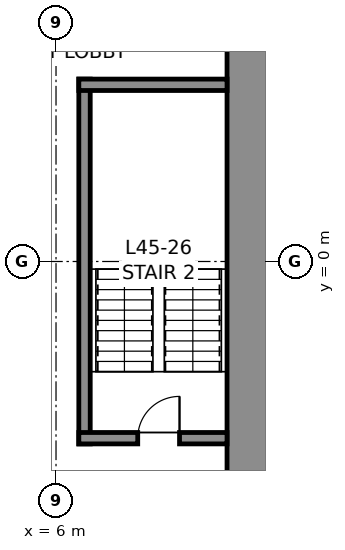
"""IFC4 building model, lengths in metres.
Left out: names, types, materials, properties, quantities, classifications, styles, units other than length and angle.
Written with IfcOpenShell. Run it as: python <this file> out.ifc"""

import sys

from ifc_helpers import new_model, si_unit, direction, frame, frame_2d, origin, place, context, subcontext, project, spatial, rectangle, extrude, element, fill, save


model = new_model("IFC4")
c1 = context("Model", 3, precision=1e-05, world=origin(), true_north=direction((0.0, 1.0)))
c2 = subcontext(c1, "Body", "Model", "MODEL_VIEW")
j1 = project(units=[si_unit("LENGTHUNIT", "METRE"), si_unit("PLANEANGLEUNIT", "RADIAN")], contexts=[c1])
p1 = place(None, origin())
s1 = spatial("IfcSite", under=j1, at=p1, CompositionType="ELEMENT")
p2 = place(p1, origin())
s2 = spatial("IfcBuilding", under=s1, at=p2, CompositionType="ELEMENT")
p3 = place(p2, frame((0.0, 0.0, 209.8)))
s3 = spatial("IfcBuildingStorey", under=s2, at=p3, CompositionType="ELEMENT", Elevation=209.8)
p4 = place(p3, frame((11.25, 10.5, 0.0), z_axis=(0.0, 0.0, 1.0), x_axis=(0.0, -1.0, 0.0)))
e1 = element("IfcWall", 1, at=p4, inside=s3, PredefinedType="SHEAR", context=c2, shape_type="SweptSolid", body=[
    extrude(rectangle(XDim=21.0, YDim=1.5, at=frame_2d((10.5, 0.0))), origin(), (0.0, 0.0, 1.0), 4.0),
])
p5 = place(p4, frame((3.7, 0.0, 0.0)))
e2 = element("IfcOpeningElement", 2, at=p5, cuts=e1, PredefinedType="OPENING", context=c2, shape_type="SweptSolid", body=[
    extrude(rectangle(XDim=1.2, YDim=2.3, at=frame_2d((0.6, 1.15))), frame((0.0, 0.76, 0.0), z_axis=(0.0, -1.0, 0.0), x_axis=(1.0, 0.0, 0.0)), (0.0, 0.0, 1.0), 1.52),
])
p6 = place(p4, frame((16.1, 0.0, 0.0)))
e3 = element("IfcOpeningElement", 3, at=p6, cuts=e1, PredefinedType="OPENING", context=c2, shape_type="SweptSolid", body=[
    extrude(rectangle(XDim=1.2, YDim=2.3, at=frame_2d((0.6, 1.15))), frame((0.0, 0.76, 0.0), z_axis=(0.0, -1.0, 0.0), x_axis=(1.0, 0.0, 0.0)), (0.0, 0.0, 1.0), 1.52),
])
p7 = place(p3, frame((6.75, -4.8, 0.0), z_axis=(0.0, 0.0, 1.0), x_axis=(0.0, 1.0, 0.0)))
e4 = element("IfcWall", 4, at=p7, inside=s3, PredefinedType="SOLIDWALL", context=c2, shape_type="SweptSolid", body=[
    extrude(rectangle(XDim=9.6, YDim=0.3, at=frame_2d((4.8, 0.0))), origin(), (0.0, 0.0, 1.0), 3.75),
])
p8 = place(p3, frame((6.6, 4.65, 0.0), z_axis=(0.0, 0.0, 1.0), x_axis=(1.0, 0.0, 0.0)))
e5 = element("IfcWall", 5, at=p8, inside=s3, PredefinedType="SOLIDWALL", context=c2, shape_type="SweptSolid", body=[
    extrude(rectangle(XDim=3.9, YDim=0.3, at=frame_2d((1.95, 0.0))), origin(), (0.0, 0.0, 1.0), 3.75),
])
p9 = place(p3, frame((10.5, -4.65, 0.0), z_axis=(0.0, 0.0, 1.0), x_axis=(-1.0, 0.0, 0.0)))
e6 = element("IfcWall", 6, at=p9, inside=s3, PredefinedType="SOLIDWALL", context=c2, shape_type="SweptSolid", body=[
    extrude(rectangle(XDim=3.9, YDim=0.3, at=frame_2d((1.95, 0.0))), origin(), (0.0, 0.0, 1.0), 3.75),
])
p10 = place(p9, frame((1.25, 0.0, 0.0)))
e7 = element("IfcOpeningElement", 7, at=p10, cuts=e6, PredefinedType="OPENING", context=c2, shape_type="SweptSolid", body=[
    extrude(rectangle(XDim=1.1, YDim=2.3, at=frame_2d((0.55, 1.15))), frame((0.0, 0.16, 0.0), z_axis=(0.0, -1.0, 0.0), x_axis=(1.0, 0.0, 0.0)), (0.0, 0.0, 1.0), 0.32),
])
p11 = place(p10, frame((1.1, 0.0, 0.0), z_axis=(0.0, 0.0, 1.0), x_axis=(-1.0, 0.0, 0.0)))
e8 = element("IfcDoor", 8, at=p11, inside=s3, OperationType="SINGLE_SWING_RIGHT", PredefinedType="DOOR", context=c2, shape_type="SweptSolid", body=[
    extrude(rectangle(XDim=1.1, YDim=2.3, at=frame_2d((0.55, 1.15))), frame((0.0, 0.025, 0.0), z_axis=(0.0, -1.0, 0.0), x_axis=(1.0, 0.0, 0.0)), (0.0, 0.0, 1.0), 0.05),
])
fill(e7, e8)
save(model, sys.argv[1])
